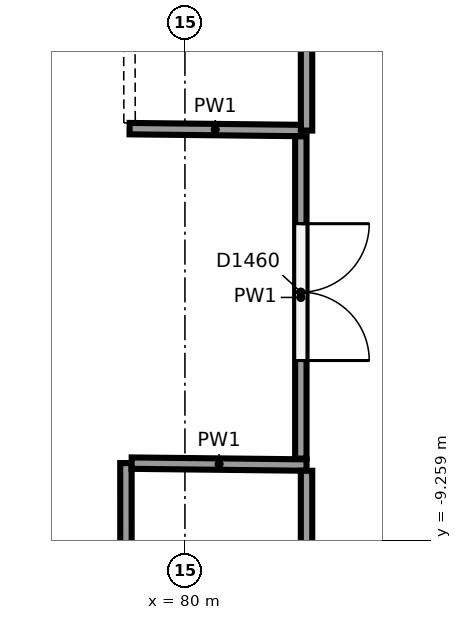
"""IFC4 building model, lengths in metres.
Left out: names, types, materials, properties, quantities, classifications, styles, units other than length and angle.
Written with IfcOpenShell. Run it as: python <this file> out.ifc"""

import sys

from ifc_helpers import new_model, si_unit, direction, frame, frame_2d, origin, place, context, subcontext, project, spatial, rectangle, extrude, element, fill, save


model = new_model("IFC4")
c1 = context("Model", 3, precision=1e-05, world=origin(), true_north=direction((0.0, 1.0)))
c2 = subcontext(c1, "Body", "Model", "MODEL_VIEW")
j1 = project(units=[si_unit("LENGTHUNIT", "METRE"), si_unit("PLANEANGLEUNIT", "RADIAN")], contexts=[c1])
p1 = place(None, origin())
s1 = spatial("IfcSite", under=j1, at=p1, CompositionType="ELEMENT")
p2 = place(p1, origin())
s2 = spatial("IfcBuilding", under=s1, at=p2, CompositionType="ELEMENT")
p3 = place(p2, frame((0.0, 0.0, 18.0)))
s3 = spatial("IfcBuildingStorey", under=s2, at=p3, CompositionType="ELEMENT", Elevation=18.0)
p4 = place(p3, frame((79.229, -17.638, 0.0), z_axis=(0.0, 0.0, 1.0), x_axis=(-0.000571770055, 0.999999836539, 0.0)))
e1 = element("IfcWall", 1, at=p4, inside=s3, PredefinedType="PARTITIONING", context=c2, shape_type="SweptSolid", body=[
    extrude(rectangle(XDim=9.394, YDim=0.15, at=frame_2d((4.697, 0.0))), origin(), (0.0, 0.0, 1.0), 5.6),
])
p5 = place(p3, frame((79.299, -8.245, 0.0), z_axis=(0.0, 0.0, 1.0), x_axis=(0.999940315913, -0.010925411323, 0.0)))
e2 = element("IfcWall", 2, at=p5, inside=s3, PredefinedType="PARTITIONING", context=c2, shape_type="SweptSolid", body=[
    extrude(rectangle(XDim=2.302, YDim=0.15, at=frame_2d((1.151, 0.0))), origin(), (0.0, 0.0, 1.0), 5.6),
])
p6 = place(p3, frame((81.6, -8.345, 0.0), z_axis=(0.0, 0.0, 1.0), x_axis=(0.0, -1.0, 0.0)))
e3 = element("IfcWall", 3, at=p6, inside=s3, PredefinedType="PARTITIONING", context=c2, shape_type="SweptSolid", body=[
    extrude(rectangle(XDim=4.805, YDim=0.15, at=frame_2d((2.402, 0.0))), origin(), (0.0, 0.0, 1.0), 5.6),
])
p7 = place(p3, frame((81.6, 0.575, 0.0), z_axis=(0.0, 0.0, 1.0), x_axis=(0.0, -1.0, 0.0)))
e4 = element("IfcWall", 4, at=p7, inside=s3, PredefinedType="PARTITIONING", context=c2, shape_type="SweptSolid", body=[
    extrude(rectangle(XDim=4.445, YDim=0.15, at=frame_2d((2.223, 0.0))), origin(), (0.0, 0.0, 1.0), 5.6),
])
p8 = place(p3, frame((81.525, -3.869, 0.0), z_axis=(0.0, 0.0, 1.0), x_axis=(-0.999940122391, 0.010943108935, 0.0)))
e5 = element("IfcWall", 5, at=p8, inside=s3, PredefinedType="PARTITIONING", context=c2, shape_type="SweptSolid", body=[
    extrude(rectangle(XDim=2.253, YDim=0.15, at=frame_2d((1.127, 0.0))), origin(), (0.0, 0.0, 1.0), 5.6),
])
p9 = place(p3, frame((79.271, -3.77, 0.0), z_axis=(0.0, 0.0, 1.0), x_axis=(-0.002436333543, 0.999997032135, 0.0)))
e6 = element("IfcWall", 6, at=p9, inside=s3, PredefinedType="PARTITIONING", context=c2, shape_type="SweptSolid", body=[
    extrude(rectangle(XDim=9.319, YDim=0.15, at=frame_2d((4.66, 0.0))), origin(), (0.0, 0.0, 1.0), 5.6),
])
p10 = place(p9, frame((4.2, 0.0, 0.0)))
e7 = element("IfcOpeningElement", 7, at=p10, cuts=e6, PredefinedType="OPENING", context=c2, shape_type="SweptSolid", body=[
    extrude(rectangle(XDim=1.0, YDim=2.1, at=frame_2d((0.5, 1.05))), frame((0.0, 0.085, 0.0), z_axis=(0.0, -1.0, 0.0), x_axis=(1.0, 0.0, 0.0)), (0.0, 0.0, 1.0), 0.17),
])
p11 = place(p3, frame((81.525, -3.945, 0.0), z_axis=(0.0, 0.0, 1.0), x_axis=(0.0, -1.0, 0.0)))
e8 = element("IfcWall", 8, at=p11, inside=s3, PredefinedType="PARTITIONING", context=c2, shape_type="SweptSolid", body=[
    extrude(rectangle(XDim=4.24, YDim=0.15, at=frame_2d((2.12, 0.0))), origin(), (0.0, 0.0, 1.0), 5.6),
])
p12 = place(p11, frame((1.15, 0.0, 0.0)))
e9 = element("IfcOpeningElement", 9, at=p12, cuts=e8, PredefinedType="OPENING", context=c2, shape_type="SweptSolid", body=[
    extrude(rectangle(XDim=1.8, YDim=2.1, at=frame_2d((0.9, 1.05))), frame((0.0, 0.085, 0.0), z_axis=(0.0, -1.0, 0.0), x_axis=(1.0, 0.0, 0.0)), (0.0, 0.0, 1.0), 0.17),
])
p13 = place(p12, origin())
e10 = element("IfcDoor", 10, at=p13, inside=s3, OperationType="DOUBLE_DOOR_SINGLE_SWING", PredefinedType="DOOR", context=c2, shape_type="SweptSolid", body=[
    extrude(rectangle(XDim=1.8, YDim=2.1, at=frame_2d((0.9, 1.05))), frame((0.0, 0.025, 0.0), z_axis=(0.0, -1.0, 0.0), x_axis=(1.0, 0.0, 0.0)), (0.0, 0.0, 1.0), 0.05),
])
fill(e9, e10)
save(model, sys.argv[1])
